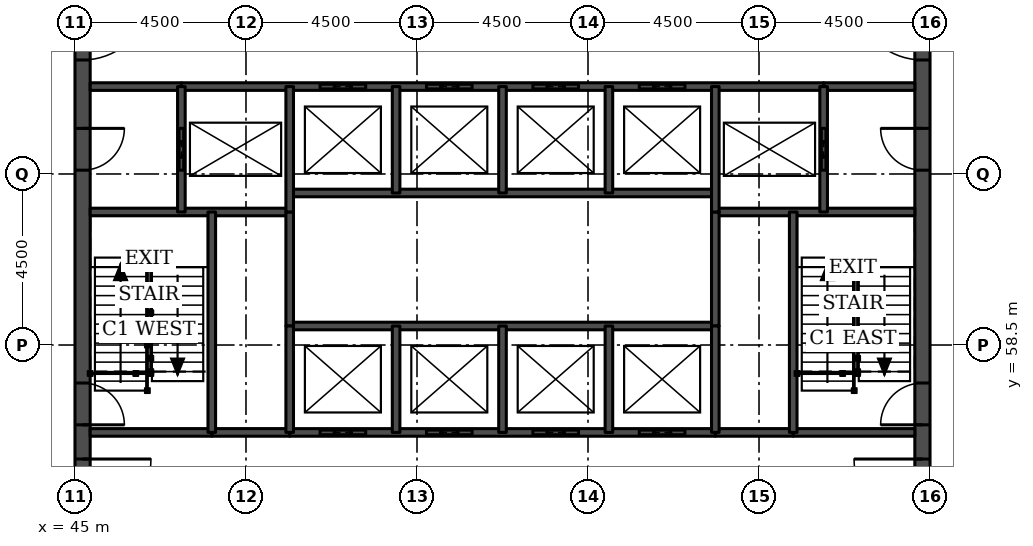
"""IFC4 building model, lengths in metres.
Left out: names, types, materials, properties, quantities, classifications, styles, units other than length and angle.
Written with IfcOpenShell. Run it as: python <this file> out.ifc"""

import sys

from ifc_helpers import new_model, si_unit, direction, frame, frame_2d, origin, place, context, subcontext, project, spatial, rectangle, extrude, element, fill, save


model = new_model("IFC4")
c1 = context("Model", 3, precision=1e-05, world=origin(), true_north=direction((0.0, 1.0)))
c2 = subcontext(c1, "Body", "Model", "MODEL_VIEW")
j1 = project(units=[si_unit("LENGTHUNIT", "METRE"), si_unit("PLANEANGLEUNIT", "RADIAN")], contexts=[c1])
p1 = place(None, origin())
s1 = spatial("IfcSite", under=j1, at=p1, CompositionType="ELEMENT")
p2 = place(p1, origin())
s2 = spatial("IfcBuilding", under=s1, at=p2, CompositionType="ELEMENT")
p3 = place(p2, frame((0.0, 0.0, 234.1)))
s3 = spatial("IfcBuildingStorey", under=s2, at=p3, CompositionType="ELEMENT", Elevation=234.1)
p4 = place(p3, frame((45.2, 49.5, 0.0), z_axis=(0.0, 0.0, 1.0), x_axis=(0.0, 1.0, 0.0)))
e1 = element("IfcWall", 1, at=p4, inside=s3, PredefinedType="SHEAR", context=c2, shape_type="SweptSolid", body=[
    extrude(rectangle(XDim=22.5, YDim=0.4, at=frame_2d((11.25, 0.0))), origin(), (0.0, 0.0, 1.0), 3.7),
])
p5 = place(p4, frame((4.2, 0.0, 0.0)))
e2 = element("IfcOpeningElement", 2, at=p5, cuts=e1, PredefinedType="OPENING", context=c2, shape_type="SweptSolid", body=[
    extrude(rectangle(XDim=1.8, YDim=2.1, at=frame_2d((0.9, 1.05))), frame((0.0, 0.21, 0.0), z_axis=(0.0, -1.0, 0.0), x_axis=(1.0, 0.0, 0.0)), (0.0, 0.0, 1.0), 0.42),
])
p6 = place(p4, frame((6.9, 0.0, 0.0)))
e3 = element("IfcOpeningElement", 3, at=p6, cuts=e1, PredefinedType="OPENING", context=c2, shape_type="SweptSolid", body=[
    extrude(rectangle(XDim=1.1, YDim=2.1, at=frame_2d((0.55, 1.05))), frame((0.0, 0.21, 0.0), z_axis=(0.0, -1.0, 0.0), x_axis=(1.0, 0.0, 0.0)), (0.0, 0.0, 1.0), 0.42),
])
p7 = place(p4, frame((13.6, 0.0, 0.0)))
e4 = element("IfcOpeningElement", 4, at=p7, cuts=e1, PredefinedType="OPENING", context=c2, shape_type="SweptSolid", body=[
    extrude(rectangle(XDim=1.1, YDim=2.1, at=frame_2d((0.55, 1.05))), frame((0.0, 0.21, 0.0), z_axis=(0.0, -1.0, 0.0), x_axis=(1.0, 0.0, 0.0)), (0.0, 0.0, 1.0), 0.42),
])
p8 = place(p4, frame((16.5, 0.0, 0.0)))
e5 = element("IfcOpeningElement", 5, at=p8, cuts=e1, PredefinedType="OPENING", context=c2, shape_type="SweptSolid", body=[
    extrude(rectangle(XDim=1.8, YDim=2.1, at=frame_2d((0.9, 1.05))), frame((0.0, 0.21, 0.0), z_axis=(0.0, -1.0, 0.0), x_axis=(1.0, 0.0, 0.0)), (0.0, 0.0, 1.0), 0.42),
])
p9 = place(p3, frame((67.3, 49.5, 0.0), z_axis=(0.0, 0.0, 1.0), x_axis=(0.0, 1.0, 0.0)))
e6 = element("IfcWall", 6, at=p9, inside=s3, PredefinedType="SHEAR", context=c2, shape_type="SweptSolid", body=[
    extrude(rectangle(XDim=22.5, YDim=0.4, at=frame_2d((11.25, 0.0))), origin(), (0.0, 0.0, 1.0), 3.7),
])
p10 = place(p9, frame((4.2, 0.0, 0.0)))
e7 = element("IfcOpeningElement", 7, at=p10, cuts=e6, PredefinedType="OPENING", context=c2, shape_type="SweptSolid", body=[
    extrude(rectangle(XDim=1.8, YDim=2.1, at=frame_2d((0.9, 1.05))), frame((0.0, 0.21, 0.0), z_axis=(0.0, -1.0, 0.0), x_axis=(1.0, 0.0, 0.0)), (0.0, 0.0, 1.0), 0.42),
])
p11 = place(p9, frame((6.9, 0.0, 0.0)))
e8 = element("IfcOpeningElement", 8, at=p11, cuts=e6, PredefinedType="OPENING", context=c2, shape_type="SweptSolid", body=[
    extrude(rectangle(XDim=1.1, YDim=2.1, at=frame_2d((0.55, 1.05))), frame((0.0, 0.21, 0.0), z_axis=(0.0, -1.0, 0.0), x_axis=(1.0, 0.0, 0.0)), (0.0, 0.0, 1.0), 0.42),
])
p12 = place(p9, frame((13.6, 0.0, 0.0)))
e9 = element("IfcOpeningElement", 9, at=p12, cuts=e6, PredefinedType="OPENING", context=c2, shape_type="SweptSolid", body=[
    extrude(rectangle(XDim=1.1, YDim=2.1, at=frame_2d((0.55, 1.05))), frame((0.0, 0.21, 0.0), z_axis=(0.0, -1.0, 0.0), x_axis=(1.0, 0.0, 0.0)), (0.0, 0.0, 1.0), 0.42),
])
p13 = place(p9, frame((16.5, 0.0, 0.0)))
e10 = element("IfcOpeningElement", 10, at=p13, cuts=e6, PredefinedType="OPENING", context=c2, shape_type="SweptSolid", body=[
    extrude(rectangle(XDim=1.8, YDim=2.1, at=frame_2d((0.9, 1.05))), frame((0.0, 0.21, 0.0), z_axis=(0.0, -1.0, 0.0), x_axis=(1.0, 0.0, 0.0)), (0.0, 0.0, 1.0), 0.42),
])
for number, where, z_axis, x_axis in (
    (11, (48.6, 56.2, 0.0), (0.0, 0.0, 1.0), (1.0, 0.0, 0.0)),
    (12, (61.85, 56.2, 0.0), (0.0, 0.0, 1.0), (1.0, 0.0, 0.0)),
):
    element("IfcWall", number, at=place(p3, frame(where, z_axis=z_axis, x_axis=x_axis)), inside=s3, PredefinedType="SOLIDWALL", context=c2, shape_type="SweptSolid", body=[
        extrude(rectangle(XDim=2.05, YDim=0.2, at=frame_2d((1.025, 0.0))), origin(), (0.0, 0.0, 1.0), 3.55),
    ])
p14 = place(p3, frame((45.4, 56.2, 0.0), z_axis=(0.0, 0.0, 1.0), x_axis=(1.0, 0.0, 0.0)))
e13 = element("IfcWall", 13, at=p14, inside=s3, PredefinedType="SOLIDWALL", context=c2, shape_type="SweptSolid", body=[
    extrude(rectangle(XDim=3.2, YDim=0.2, at=frame_2d((1.6, 0.0))), origin(), (0.0, 0.0, 1.0), 3.55),
])
p15 = place(p3, frame((50.65, 56.2, 0.0), z_axis=(0.0, 0.0, 1.0), x_axis=(1.0, 0.0, 0.0)))
e14 = element("IfcWall", 14, at=p15, inside=s3, PredefinedType="SOLIDWALL", context=c2, shape_type="SweptSolid", body=[
    extrude(rectangle(XDim=11.2, YDim=0.2, at=frame_2d((5.6, 0.0))), origin(), (0.0, 0.0, 1.0), 3.55),
])
p16 = place(p15, frame((0.8, 0.0, 0.0)))
e15 = element("IfcOpeningElement", 15, at=p16, cuts=e14, PredefinedType="OPENING", context=c2, shape_type="SweptSolid", body=[
    extrude(rectangle(XDim=1.2, YDim=2.1, at=frame_2d((0.6, 1.05))), frame((0.0, 0.11, 0.0), z_axis=(0.0, -1.0, 0.0), x_axis=(1.0, 0.0, 0.0)), (0.0, 0.0, 1.0), 0.22),
])
p17 = place(p15, frame((3.6, 0.0, 0.0)))
e16 = element("IfcOpeningElement", 16, at=p17, cuts=e14, PredefinedType="OPENING", context=c2, shape_type="SweptSolid", body=[
    extrude(rectangle(XDim=1.2, YDim=2.1, at=frame_2d((0.6, 1.05))), frame((0.0, 0.11, 0.0), z_axis=(0.0, -1.0, 0.0), x_axis=(1.0, 0.0, 0.0)), (0.0, 0.0, 1.0), 0.22),
])
p18 = place(p15, frame((6.4, 0.0, 0.0)))
e17 = element("IfcOpeningElement", 17, at=p18, cuts=e14, PredefinedType="OPENING", context=c2, shape_type="SweptSolid", body=[
    extrude(rectangle(XDim=1.2, YDim=2.1, at=frame_2d((0.6, 1.05))), frame((0.0, 0.11, 0.0), z_axis=(0.0, -1.0, 0.0), x_axis=(1.0, 0.0, 0.0)), (0.0, 0.0, 1.0), 0.22),
])
p19 = place(p15, frame((9.2, 0.0, 0.0)))
e18 = element("IfcOpeningElement", 18, at=p19, cuts=e14, PredefinedType="OPENING", context=c2, shape_type="SweptSolid", body=[
    extrude(rectangle(XDim=1.2, YDim=2.1, at=frame_2d((0.6, 1.05))), frame((0.0, 0.11, 0.0), z_axis=(0.0, -1.0, 0.0), x_axis=(1.0, 0.0, 0.0)), (0.0, 0.0, 1.0), 0.22),
])
p20 = place(p3, frame((63.9, 56.2, 0.0), z_axis=(0.0, 0.0, 1.0), x_axis=(1.0, 0.0, 0.0)))
e19 = element("IfcWall", 19, at=p20, inside=s3, PredefinedType="SOLIDWALL", context=c2, shape_type="SweptSolid", body=[
    extrude(rectangle(XDim=3.2, YDim=0.2, at=frame_2d((1.6, 0.0))), origin(), (0.0, 0.0, 1.0), 3.55),
])
p21 = place(p3, frame((50.65, 59.0, 0.0), z_axis=(0.0, 0.0, 1.0), x_axis=(1.0, 0.0, 0.0)))
e20 = element("IfcWall", 20, at=p21, inside=s3, PredefinedType="SOLIDWALL", context=c2, shape_type="SweptSolid", body=[
    extrude(rectangle(XDim=11.2, YDim=0.2, at=frame_2d((5.6, 0.0))), origin(), (0.0, 0.0, 1.0), 3.7),
])
for number, where, z_axis, x_axis in (
    (21, (45.4, 62.0, 0.0), (0.0, 0.0, 1.0), (1.0, 0.0, 0.0)),
    (22, (61.85, 62.0, 0.0), (0.0, 0.0, 1.0), (1.0, 0.0, 0.0)),
):
    element("IfcWall", number, at=place(p3, frame(where, z_axis=z_axis, x_axis=x_axis)), inside=s3, PredefinedType="SOLIDWALL", context=c2, shape_type="SweptSolid", body=[
        extrude(rectangle(XDim=5.25, YDim=0.2, at=frame_2d((2.625, 0.0))), origin(), (0.0, 0.0, 1.0), 3.55),
    ])
p22 = place(p3, frame((50.65, 62.5, 0.0), z_axis=(0.0, 0.0, 1.0), x_axis=(1.0, 0.0, 0.0)))
e23 = element("IfcWall", 23, at=p22, inside=s3, PredefinedType="SOLIDWALL", context=c2, shape_type="SweptSolid", body=[
    extrude(rectangle(XDim=11.2, YDim=0.2, at=frame_2d((5.6, 0.0))), origin(), (0.0, 0.0, 1.0), 3.7),
])
for number, where, z_axis, x_axis in (
    (24, (45.4, 65.3, 0.0), (0.0, 0.0, 1.0), (1.0, 0.0, 0.0)),
    (25, (64.7, 65.3, 0.0), (0.0, 0.0, 1.0), (1.0, 0.0, 0.0)),
):
    element("IfcWall", number, at=place(p3, frame(where, z_axis=z_axis, x_axis=x_axis)), inside=s3, PredefinedType="SOLIDWALL", context=c2, shape_type="SweptSolid", body=[
        extrude(rectangle(XDim=2.4, YDim=0.2, at=frame_2d((1.2, 0.0))), origin(), (0.0, 0.0, 1.0), 3.55),
    ])
p23 = place(p3, frame((47.8, 65.3, 0.0), z_axis=(0.0, 0.0, 1.0), x_axis=(1.0, 0.0, 0.0)))
e26 = element("IfcWall", 26, at=p23, inside=s3, PredefinedType="SOLIDWALL", context=c2, shape_type="SweptSolid", body=[
    extrude(rectangle(XDim=16.9, YDim=0.2, at=frame_2d((8.45, 0.0))), origin(), (0.0, 0.0, 1.0), 3.55),
])
p24 = place(p23, frame((3.65, 0.0, 0.0)))
e27 = element("IfcOpeningElement", 27, at=p24, cuts=e26, PredefinedType="OPENING", context=c2, shape_type="SweptSolid", body=[
    extrude(rectangle(XDim=1.2, YDim=2.1, at=frame_2d((0.6, 1.05))), frame((0.0, 0.11, 0.0), z_axis=(0.0, -1.0, 0.0), x_axis=(1.0, 0.0, 0.0)), (0.0, 0.0, 1.0), 0.22),
])
p25 = place(p23, frame((6.45, 0.0, 0.0)))
e28 = element("IfcOpeningElement", 28, at=p25, cuts=e26, PredefinedType="OPENING", context=c2, shape_type="SweptSolid", body=[
    extrude(rectangle(XDim=1.2, YDim=2.1, at=frame_2d((0.6, 1.05))), frame((0.0, 0.11, 0.0), z_axis=(0.0, -1.0, 0.0), x_axis=(1.0, 0.0, 0.0)), (0.0, 0.0, 1.0), 0.22),
])
p26 = place(p23, frame((9.25, 0.0, 0.0)))
e29 = element("IfcOpeningElement", 29, at=p26, cuts=e26, PredefinedType="OPENING", context=c2, shape_type="SweptSolid", body=[
    extrude(rectangle(XDim=1.2, YDim=2.1, at=frame_2d((0.6, 1.05))), frame((0.0, 0.11, 0.0), z_axis=(0.0, -1.0, 0.0), x_axis=(1.0, 0.0, 0.0)), (0.0, 0.0, 1.0), 0.22),
])
p27 = place(p23, frame((12.05, 0.0, 0.0)))
e30 = element("IfcOpeningElement", 30, at=p27, cuts=e26, PredefinedType="OPENING", context=c2, shape_type="SweptSolid", body=[
    extrude(rectangle(XDim=1.2, YDim=2.1, at=frame_2d((0.6, 1.05))), frame((0.0, 0.11, 0.0), z_axis=(0.0, -1.0, 0.0), x_axis=(1.0, 0.0, 0.0)), (0.0, 0.0, 1.0), 0.22),
])
p28 = place(p3, frame((47.8, 62.0, 0.0), z_axis=(0.0, 0.0, 1.0), x_axis=(0.0, 1.0, 0.0)))
e31 = element("IfcWall", 31, at=p28, inside=s3, PredefinedType="SOLIDWALL", context=c2, shape_type="SweptSolid", body=[
    extrude(rectangle(XDim=3.3, YDim=0.2, at=frame_2d((1.65, 0.0))), origin(), (0.0, 0.0, 1.0), 3.55),
])
p29 = place(p28, frame((1.1, 0.0, 0.0)))
e32 = element("IfcOpeningElement", 32, at=p29, cuts=e31, PredefinedType="OPENING", context=c2, shape_type="SweptSolid", body=[
    extrude(rectangle(XDim=1.1, YDim=2.1, at=frame_2d((0.55, 1.05))), frame((0.0, 0.11, 0.0), z_axis=(0.0, -1.0, 0.0), x_axis=(1.0, 0.0, 0.0)), (0.0, 0.0, 1.0), 0.22),
])
p30 = place(p3, frame((48.6, 56.2, 0.0), z_axis=(0.0, 0.0, 1.0), x_axis=(0.0, 1.0, 0.0)))
e33 = element("IfcWall", 33, at=p30, inside=s3, PredefinedType="SOLIDWALL", context=c2, shape_type="SweptSolid", body=[
    extrude(rectangle(XDim=5.8, YDim=0.2, at=frame_2d((2.9, 0.0))), origin(), (0.0, 0.0, 1.0), 3.55),
])
p31 = place(p3, frame((50.65, 59.0, 0.0), z_axis=(0.0, 0.0, 1.0), x_axis=(0.0, 1.0, 0.0)))
e34 = element("IfcWall", 34, at=p31, inside=s3, PredefinedType="SOLIDWALL", context=c2, shape_type="SweptSolid", body=[
    extrude(rectangle(XDim=3.0, YDim=0.2, at=frame_2d((1.5, 0.0))), origin(), (0.0, 0.0, 1.0), 3.7),
])
p32 = place(p3, frame((50.65, 56.2, 0.0), z_axis=(0.0, 0.0, 1.0), x_axis=(0.0, 1.0, 0.0)))
e35 = element("IfcWall", 35, at=p32, inside=s3, PredefinedType="SOLIDWALL", context=c2, shape_type="SweptSolid", body=[
    extrude(rectangle(XDim=2.8, YDim=0.2, at=frame_2d((1.4, 0.0))), origin(), (0.0, 0.0, 1.0), 3.55),
])
p33 = place(p3, frame((50.65, 62.0, 0.0), z_axis=(0.0, 0.0, 1.0), x_axis=(0.0, 1.0, 0.0)))
e36 = element("IfcWall", 36, at=p33, inside=s3, PredefinedType="SOLIDWALL", context=c2, shape_type="SweptSolid", body=[
    extrude(rectangle(XDim=3.3, YDim=0.2, at=frame_2d((1.65, 0.0))), origin(), (0.0, 0.0, 1.0), 3.55),
])
for number, where, z_axis, x_axis in (
    (37, (53.45, 56.2, 0.0), (0.0, 0.0, 1.0), (0.0, 1.0, 0.0)),
    (38, (53.45, 62.5, 0.0), (0.0, 0.0, 1.0), (0.0, 1.0, 0.0)),
    (39, (56.25, 56.2, 0.0), (0.0, 0.0, 1.0), (0.0, 1.0, 0.0)),
    (40, (56.25, 62.5, 0.0), (0.0, 0.0, 1.0), (0.0, 1.0, 0.0)),
    (41, (59.05, 56.2, 0.0), (0.0, 0.0, 1.0), (0.0, 1.0, 0.0)),
    (42, (59.05, 62.5, 0.0), (0.0, 0.0, 1.0), (0.0, 1.0, 0.0)),
):
    element("IfcWall", number, at=place(p3, frame(where, z_axis=z_axis, x_axis=x_axis)), inside=s3, PredefinedType="SOLIDWALL", context=c2, shape_type="SweptSolid", body=[
        extrude(rectangle(XDim=2.8, YDim=0.2, at=frame_2d((1.4, 0.0))), origin(), (0.0, 0.0, 1.0), 3.55),
    ])
p34 = place(p3, frame((61.85, 59.0, 0.0), z_axis=(0.0, 0.0, 1.0), x_axis=(0.0, 1.0, 0.0)))
e43 = element("IfcWall", 43, at=p34, inside=s3, PredefinedType="SOLIDWALL", context=c2, shape_type="SweptSolid", body=[
    extrude(rectangle(XDim=3.0, YDim=0.2, at=frame_2d((1.5, 0.0))), origin(), (0.0, 0.0, 1.0), 3.7),
])
p35 = place(p3, frame((61.85, 56.2, 0.0), z_axis=(0.0, 0.0, 1.0), x_axis=(0.0, 1.0, 0.0)))
e44 = element("IfcWall", 44, at=p35, inside=s3, PredefinedType="SOLIDWALL", context=c2, shape_type="SweptSolid", body=[
    extrude(rectangle(XDim=2.8, YDim=0.2, at=frame_2d((1.4, 0.0))), origin(), (0.0, 0.0, 1.0), 3.55),
])
p36 = place(p3, frame((61.85, 62.0, 0.0), z_axis=(0.0, 0.0, 1.0), x_axis=(0.0, 1.0, 0.0)))
e45 = element("IfcWall", 45, at=p36, inside=s3, PredefinedType="SOLIDWALL", context=c2, shape_type="SweptSolid", body=[
    extrude(rectangle(XDim=3.3, YDim=0.2, at=frame_2d((1.65, 0.0))), origin(), (0.0, 0.0, 1.0), 3.55),
])
p37 = place(p3, frame((63.9, 56.2, 0.0), z_axis=(0.0, 0.0, 1.0), x_axis=(0.0, 1.0, 0.0)))
e46 = element("IfcWall", 46, at=p37, inside=s3, PredefinedType="SOLIDWALL", context=c2, shape_type="SweptSolid", body=[
    extrude(rectangle(XDim=5.8, YDim=0.2, at=frame_2d((2.9, 0.0))), origin(), (0.0, 0.0, 1.0), 3.55),
])
p38 = place(p3, frame((64.7, 62.0, 0.0), z_axis=(0.0, 0.0, 1.0), x_axis=(0.0, 1.0, 0.0)))
e47 = element("IfcWall", 47, at=p38, inside=s3, PredefinedType="SOLIDWALL", context=c2, shape_type="SweptSolid", body=[
    extrude(rectangle(XDim=3.3, YDim=0.2, at=frame_2d((1.65, 0.0))), origin(), (0.0, 0.0, 1.0), 3.55),
])
p39 = place(p38, frame((1.1, 0.0, 0.0)))
e48 = element("IfcOpeningElement", 48, at=p39, cuts=e47, PredefinedType="OPENING", context=c2, shape_type="SweptSolid", body=[
    extrude(rectangle(XDim=1.1, YDim=2.1, at=frame_2d((0.55, 1.05))), frame((0.0, 0.11, 0.0), z_axis=(0.0, -1.0, 0.0), x_axis=(1.0, 0.0, 0.0)), (0.0, 0.0, 1.0), 0.22),
])
p40 = place(p16, origin())
e49 = element("IfcDoor", 49, at=p40, inside=s3, OperationType="DOUBLE_DOOR_SLIDING", PredefinedType="DOOR", context=c2, shape_type="SweptSolid", body=[
    extrude(rectangle(XDim=1.2, YDim=2.1, at=frame_2d((0.6, 1.05))), frame((0.0, 0.025, 0.0), z_axis=(0.0, -1.0, 0.0), x_axis=(1.0, 0.0, 0.0)), (0.0, 0.0, 1.0), 0.05),
])
fill(e15, e49)
p41 = place(p17, origin())
e50 = element("IfcDoor", 50, at=p41, inside=s3, OperationType="DOUBLE_DOOR_SLIDING", PredefinedType="DOOR", context=c2, shape_type="SweptSolid", body=[
    extrude(rectangle(XDim=1.2, YDim=2.1, at=frame_2d((0.6, 1.05))), frame((0.0, 0.025, 0.0), z_axis=(0.0, -1.0, 0.0), x_axis=(1.0, 0.0, 0.0)), (0.0, 0.0, 1.0), 0.05),
])
fill(e16, e50)
p42 = place(p18, origin())
e51 = element("IfcDoor", 51, at=p42, inside=s3, OperationType="DOUBLE_DOOR_SLIDING", PredefinedType="DOOR", context=c2, shape_type="SweptSolid", body=[
    extrude(rectangle(XDim=1.2, YDim=2.1, at=frame_2d((0.6, 1.05))), frame((0.0, 0.025, 0.0), z_axis=(0.0, -1.0, 0.0), x_axis=(1.0, 0.0, 0.0)), (0.0, 0.0, 1.0), 0.05),
])
fill(e17, e51)
p43 = place(p19, origin())
e52 = element("IfcDoor", 52, at=p43, inside=s3, OperationType="DOUBLE_DOOR_SLIDING", PredefinedType="DOOR", context=c2, shape_type="SweptSolid", body=[
    extrude(rectangle(XDim=1.2, YDim=2.1, at=frame_2d((0.6, 1.05))), frame((0.0, 0.025, 0.0), z_axis=(0.0, -1.0, 0.0), x_axis=(1.0, 0.0, 0.0)), (0.0, 0.0, 1.0), 0.05),
])
fill(e18, e52)
p44 = place(p24, origin())
e53 = element("IfcDoor", 53, at=p44, inside=s3, OperationType="DOUBLE_DOOR_SLIDING", PredefinedType="DOOR", context=c2, shape_type="SweptSolid", body=[
    extrude(rectangle(XDim=1.2, YDim=2.1, at=frame_2d((0.6, 1.05))), frame((0.0, 0.025, 0.0), z_axis=(0.0, -1.0, 0.0), x_axis=(1.0, 0.0, 0.0)), (0.0, 0.0, 1.0), 0.05),
])
fill(e27, e53)
p45 = place(p25, origin())
e54 = element("IfcDoor", 54, at=p45, inside=s3, OperationType="DOUBLE_DOOR_SLIDING", PredefinedType="DOOR", context=c2, shape_type="SweptSolid", body=[
    extrude(rectangle(XDim=1.2, YDim=2.1, at=frame_2d((0.6, 1.05))), frame((0.0, 0.025, 0.0), z_axis=(0.0, -1.0, 0.0), x_axis=(1.0, 0.0, 0.0)), (0.0, 0.0, 1.0), 0.05),
])
fill(e28, e54)
p46 = place(p26, origin())
e55 = element("IfcDoor", 55, at=p46, inside=s3, OperationType="DOUBLE_DOOR_SLIDING", PredefinedType="DOOR", context=c2, shape_type="SweptSolid", body=[
    extrude(rectangle(XDim=1.2, YDim=2.1, at=frame_2d((0.6, 1.05))), frame((0.0, 0.025, 0.0), z_axis=(0.0, -1.0, 0.0), x_axis=(1.0, 0.0, 0.0)), (0.0, 0.0, 1.0), 0.05),
])
fill(e29, e55)
p47 = place(p27, origin())
e56 = element("IfcDoor", 56, at=p47, inside=s3, OperationType="DOUBLE_DOOR_SLIDING", PredefinedType="DOOR", context=c2, shape_type="SweptSolid", body=[
    extrude(rectangle(XDim=1.2, YDim=2.1, at=frame_2d((0.6, 1.05))), frame((0.0, 0.025, 0.0), z_axis=(0.0, -1.0, 0.0), x_axis=(1.0, 0.0, 0.0)), (0.0, 0.0, 1.0), 0.05),
])
fill(e30, e56)
p48 = place(p29, origin())
e57 = element("IfcDoor", 57, at=p48, inside=s3, OperationType="DOUBLE_DOOR_SLIDING", PredefinedType="DOOR", context=c2, shape_type="SweptSolid", body=[
    extrude(rectangle(XDim=1.1, YDim=2.1, at=frame_2d((0.55, 1.05))), frame((0.0, 0.025, 0.0), z_axis=(0.0, -1.0, 0.0), x_axis=(1.0, 0.0, 0.0)), (0.0, 0.0, 1.0), 0.05),
])
fill(e32, e57)
p49 = place(p39, origin())
e58 = element("IfcDoor", 58, at=p49, inside=s3, OperationType="DOUBLE_DOOR_SLIDING", PredefinedType="DOOR", context=c2, shape_type="SweptSolid", body=[
    extrude(rectangle(XDim=1.1, YDim=2.1, at=frame_2d((0.55, 1.05))), frame((0.0, 0.025, 0.0), z_axis=(0.0, -1.0, 0.0), x_axis=(1.0, 0.0, 0.0)), (0.0, 0.0, 1.0), 0.05),
])
fill(e48, e58)
p50 = place(p5, frame((1.8, 0.0, 0.0), z_axis=(0.0, 0.0, 1.0), x_axis=(-1.0, 0.0, 0.0)))
e59 = element("IfcDoor", 59, at=p50, inside=s3, OperationType="SINGLE_SWING_LEFT", PredefinedType="DOOR", context=c2, shape_type="SweptSolid", body=[
    extrude(rectangle(XDim=1.8, YDim=2.1, at=frame_2d((0.9, 1.05))), frame((0.0, 0.025, 0.0), z_axis=(0.0, -1.0, 0.0), x_axis=(1.0, 0.0, 0.0)), (0.0, 0.0, 1.0), 0.05),
])
fill(e2, e59)
p51 = place(p6, frame((1.1, 0.0, 0.0), z_axis=(0.0, 0.0, 1.0), x_axis=(-1.0, 0.0, 0.0)))
e60 = element("IfcDoor", 60, at=p51, inside=s3, OperationType="SINGLE_SWING_RIGHT", PredefinedType="DOOR", context=c2, shape_type="SweptSolid", body=[
    extrude(rectangle(XDim=1.1, YDim=2.1, at=frame_2d((0.55, 1.05))), frame((0.0, 0.025, 0.0), z_axis=(0.0, -1.0, 0.0), x_axis=(1.0, 0.0, 0.0)), (0.0, 0.0, 1.0), 0.05),
])
fill(e3, e60)
p52 = place(p7, frame((1.1, 0.0, 0.0), z_axis=(0.0, 0.0, 1.0), x_axis=(-1.0, 0.0, 0.0)))
e61 = element("IfcDoor", 61, at=p52, inside=s3, OperationType="SINGLE_SWING_LEFT", PredefinedType="DOOR", context=c2, shape_type="SweptSolid", body=[
    extrude(rectangle(XDim=1.1, YDim=2.1, at=frame_2d((0.55, 1.05))), frame((0.0, 0.025, 0.0), z_axis=(0.0, -1.0, 0.0), x_axis=(1.0, 0.0, 0.0)), (0.0, 0.0, 1.0), 0.05),
])
fill(e4, e61)
p53 = place(p8, frame((1.8, 0.0, 0.0), z_axis=(0.0, 0.0, 1.0), x_axis=(-1.0, 0.0, 0.0)))
e62 = element("IfcDoor", 62, at=p53, inside=s3, OperationType="SINGLE_SWING_LEFT", PredefinedType="DOOR", context=c2, shape_type="SweptSolid", body=[
    extrude(rectangle(XDim=1.8, YDim=2.1, at=frame_2d((0.9, 1.05))), frame((0.0, 0.025, 0.0), z_axis=(0.0, -1.0, 0.0), x_axis=(1.0, 0.0, 0.0)), (0.0, 0.0, 1.0), 0.05),
])
fill(e5, e62)
p54 = place(p10, origin())
e63 = element("IfcDoor", 63, at=p54, inside=s3, OperationType="SINGLE_SWING_RIGHT", PredefinedType="DOOR", context=c2, shape_type="SweptSolid", body=[
    extrude(rectangle(XDim=1.8, YDim=2.1, at=frame_2d((0.9, 1.05))), frame((0.0, 0.025, 0.0), z_axis=(0.0, -1.0, 0.0), x_axis=(1.0, 0.0, 0.0)), (0.0, 0.0, 1.0), 0.05),
])
fill(e7, e63)
p55 = place(p11, origin())
e64 = element("IfcDoor", 64, at=p55, inside=s3, OperationType="SINGLE_SWING_LEFT", PredefinedType="DOOR", context=c2, shape_type="SweptSolid", body=[
    extrude(rectangle(XDim=1.1, YDim=2.1, at=frame_2d((0.55, 1.05))), frame((0.0, 0.025, 0.0), z_axis=(0.0, -1.0, 0.0), x_axis=(1.0, 0.0, 0.0)), (0.0, 0.0, 1.0), 0.05),
])
fill(e8, e64)
p56 = place(p12, origin())
e65 = element("IfcDoor", 65, at=p56, inside=s3, OperationType="SINGLE_SWING_RIGHT", PredefinedType="DOOR", context=c2, shape_type="SweptSolid", body=[
    extrude(rectangle(XDim=1.1, YDim=2.1, at=frame_2d((0.55, 1.05))), frame((0.0, 0.025, 0.0), z_axis=(0.0, -1.0, 0.0), x_axis=(1.0, 0.0, 0.0)), (0.0, 0.0, 1.0), 0.05),
])
fill(e9, e65)
p57 = place(p13, origin())
e66 = element("IfcDoor", 66, at=p57, inside=s3, OperationType="SINGLE_SWING_RIGHT", PredefinedType="DOOR", context=c2, shape_type="SweptSolid", body=[
    extrude(rectangle(XDim=1.8, YDim=2.1, at=frame_2d((0.9, 1.05))), frame((0.0, 0.025, 0.0), z_axis=(0.0, -1.0, 0.0), x_axis=(1.0, 0.0, 0.0)), (0.0, 0.0, 1.0), 0.05),
])
fill(e10, e66)
save(model, sys.argv[1])
